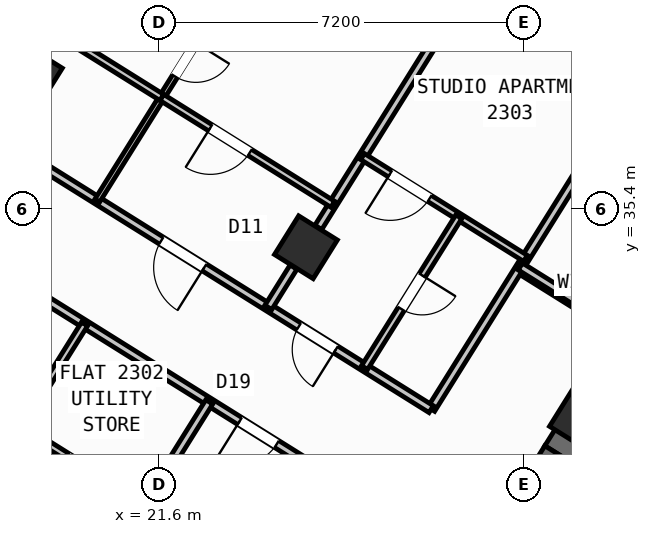
"""IFC4 building model, lengths in metres.
Left out: names, types, materials, properties, quantities, classifications, styles, units other than length and angle.
Written with IfcOpenShell. Run it as: python <this file> out.ifc"""

import sys

from ifc_helpers import new_model, si_unit, direction, frame, frame_2d, origin, origin_2d, place, context, subcontext, project, spatial, rectangle, hollow_rectangle, extrude, source, transform, mapped, element, fill, save


model = new_model("IFC4")
c1 = context("Model", 3, precision=1e-05, world=origin(), true_north=direction((0.0, 1.0)))
c2 = subcontext(c1, "Body", "Model", "MODEL_VIEW")
j1 = project(units=[si_unit("LENGTHUNIT", "METRE"), si_unit("PLANEANGLEUNIT", "RADIAN")], contexts=[c1])
p1 = place(None, origin())
s1 = spatial("IfcSite", under=j1, at=p1, CompositionType="ELEMENT")
p2 = place(p1, origin())
s2 = spatial("IfcBuilding", under=s1, at=p2, CompositionType="ELEMENT")
p3 = place(p2, frame((0.0, 0.0, 93.6)))
s3 = spatial("IfcBuildingStorey", under=s2, at=p3, CompositionType="ELEMENT", Elevation=93.6)
p4 = place(p3, frame((40.615, 23.983, 0.0), z_axis=(0.0, 0.0, 1.0), x_axis=(-0.848045953968, 0.529922692436, 0.0)))
e1 = element("IfcWall", 1, at=p4, inside=s3, PredefinedType="SHEAR", context=c2, shape_type="SweptSolid", body=[
    extrude(rectangle(XDim=13.24, YDim=0.65, at=frame_2d((6.62, 0.0))), origin(), (0.0, 0.0, 1.0), 3.35),
])
p5 = place(p3, frame((29.491, 30.552, 0.0), z_axis=(0.0, 0.0, 1.0), x_axis=(-0.529893103397, -0.8480644427, 0.0)))
e2 = element("IfcWall", 2, at=p5, inside=s3, PredefinedType="SHEAR", context=c2, shape_type="SweptSolid", body=[
    extrude(rectangle(XDim=3.525, YDim=0.65, at=frame_2d((1.763, 0.0))), origin(), (0.0, 0.0, 1.0), 3.35),
])
m1 = source(origin(), c2, "Body", "SweptSolid", [
    extrude(hollow_rectangle(XDim=0.9, YDim=0.9, WallThickness=0.036, at=origin_2d()), origin(), (0.0, 0.0, 1.0), 3.6),
])
for number, where, z_axis, x_axis in (
    (3, (29.928, 31.251, 0.0), (0.0, 0.0, 1.0), (-0.848, 0.53, 0.0)),
    (4, (24.5, 34.643, 0.0), (0.0, 0.0, 1.0), (-0.848, 0.53, 0.0)),
    (5, (19.073, 38.034, 0.0), (0.0, 0.0, 1.0), (-0.848, 0.53, 0.0)),
):
    element("IfcColumn", number, at=place(p3, frame(where, z_axis=z_axis, x_axis=x_axis)), inside=s3, PredefinedType="COLUMN", context=c2, shape_type="MappedRepresentation", body=[
        mapped(m1, transform((0.0, 0.0, 0.0), scale=1.0)),
    ])
p6 = place(p3, frame((17.424, 47.083, 0.0), z_axis=(0.0, 0.0, 1.0), x_axis=(0.848049927979, -0.529916332693, 0.0)))
e6 = element("IfcWall", 6, at=p6, inside=s3, PredefinedType="STANDARD", context=c2, shape_type="SweptSolid", body=[
    extrude(rectangle(XDim=29.223, YDim=0.32, at=frame_2d((14.612, 0.0))), origin(), (0.0, 0.0, 1.0), 3.35),
])
p7 = place(p6, frame((3.745, 0.0, 0.0)))
e7 = element("IfcOpeningElement", 7, at=p7, cuts=e6, PredefinedType="OPENING", context=c2, shape_type="SweptSolid", body=[
    extrude(rectangle(XDim=1.05, YDim=2.15, at=frame_2d((0.525, 1.075))), frame((0.0, 0.17, 0.0), z_axis=(0.0, -1.0, 0.0), x_axis=(1.0, 0.0, 0.0)), (0.0, 0.0, 1.0), 0.34),
])
p8 = place(p6, frame((0.699, 0.0, 0.95)))
e8 = element("IfcOpeningElement", 8, at=p8, cuts=e6, PredefinedType="OPENING", context=c2, shape_type="SweptSolid", body=[
    extrude(rectangle(XDim=1.2, YDim=1.4, at=frame_2d((0.6, 0.7))), frame((0.0, 0.17, 0.0), z_axis=(0.0, -1.0, 0.0), x_axis=(1.0, 0.0, 0.0)), (0.0, 0.0, 1.0), 0.34),
])
p9 = place(p6, frame((6.951, 0.0, 1.0)))
e9 = element("IfcOpeningElement", 9, at=p9, cuts=e6, PredefinedType="OPENING", context=c2, shape_type="SweptSolid", body=[
    extrude(rectangle(XDim=0.9, YDim=1.25, at=frame_2d((0.45, 0.625))), frame((0.0, 0.17, 0.0), z_axis=(0.0, -1.0, 0.0), x_axis=(1.0, 0.0, 0.0)), (0.0, 0.0, 1.0), 0.34),
])
p10 = place(p6, frame((9.841, 0.0, 0.85)))
e10 = element("IfcOpeningElement", 10, at=p10, cuts=e6, PredefinedType="OPENING", context=c2, shape_type="SweptSolid", body=[
    extrude(rectangle(XDim=1.5, YDim=1.5, at=frame_2d((0.75, 0.75))), frame((0.0, 0.17, 0.0), z_axis=(0.0, -1.0, 0.0), x_axis=(1.0, 0.0, 0.0)), (0.0, 0.0, 1.0), 0.34),
])
p11 = place(p6, frame((13.889, 0.0, 0.95)))
e11 = element("IfcOpeningElement", 11, at=p11, cuts=e6, PredefinedType="OPENING", context=c2, shape_type="SweptSolid", body=[
    extrude(rectangle(XDim=1.2, YDim=1.4, at=frame_2d((0.6, 0.7))), frame((0.0, 0.17, 0.0), z_axis=(0.0, -1.0, 0.0), x_axis=(1.0, 0.0, 0.0)), (0.0, 0.0, 1.0), 0.34),
])
p12 = place(p6, frame((17.254, 0.0, 1.0)))
e12 = element("IfcOpeningElement", 12, at=p12, cuts=e6, PredefinedType="OPENING", context=c2, shape_type="SweptSolid", body=[
    extrude(rectangle(XDim=0.9, YDim=1.25, at=frame_2d((0.45, 0.625))), frame((0.0, 0.17, 0.0), z_axis=(0.0, -1.0, 0.0), x_axis=(1.0, 0.0, 0.0)), (0.0, 0.0, 1.0), 0.34),
])
p13 = place(p6, frame((20.764, 0.0, 0.8)))
e13 = element("IfcOpeningElement", 13, at=p13, cuts=e6, PredefinedType="OPENING", context=c2, shape_type="SweptSolid", body=[
    extrude(rectangle(XDim=2.1, YDim=1.55, at=frame_2d((1.05, 0.775))), frame((0.0, 0.17, 0.0), z_axis=(0.0, -1.0, 0.0), x_axis=(1.0, 0.0, 0.0)), (0.0, 0.0, 1.0), 0.34),
])
p14 = place(p6, frame((25.403, 0.0, 0.8)))
e14 = element("IfcOpeningElement", 14, at=p14, cuts=e6, PredefinedType="OPENING", context=c2, shape_type="SweptSolid", body=[
    extrude(rectangle(XDim=2.1, YDim=1.55, at=frame_2d((1.05, 0.775))), frame((0.0, 0.17, 0.0), z_axis=(0.0, -1.0, 0.0), x_axis=(1.0, 0.0, 0.0)), (0.0, 0.0, 1.0), 0.34),
])
p15 = place(p3, frame((30.914, 32.829, 0.0), z_axis=(0.0, 0.0, 1.0), x_axis=(-0.848008813643, 0.529982124211, 0.0)))
e15 = element("IfcWall", 15, at=p15, inside=s3, PredefinedType="PARTITIONING", context=c2, shape_type="SweptSolid", body=[
    extrude(rectangle(XDim=2.61, YDim=0.16, at=frame_2d((1.305, 0.0))), origin(), (0.0, 0.0, 1.0), 3.34),
])
p16 = place(p3, frame((31.239, 38.274, 0.0), z_axis=(0.0, 0.0, 1.0), x_axis=(-0.529928058306, -0.848042600947, 0.0)))
e16 = element("IfcWall", 16, at=p16, inside=s3, PredefinedType="PARTITIONING", context=c2, shape_type="SweptSolid", body=[
    extrude(rectangle(XDim=8.05, YDim=0.16, at=frame_2d((4.025, 0.0))), origin(), (0.0, 0.0, 1.0), 3.34),
])
p17 = place(p3, frame((26.973, 31.447, 0.0), z_axis=(0.0, 0.0, 1.0), x_axis=(-0.848048310262, 0.529918921593, 0.0)))
e17 = element("IfcWall", 17, at=p17, inside=s3, PredefinedType="PARTITIONING", context=c2, shape_type="SweptSolid", body=[
    extrude(rectangle(XDim=16.73, YDim=0.16, at=frame_2d((8.365, 0.0))), origin(), (0.0, 0.0, 1.0), 3.34),
])
p18 = place(p17, frame((2.22, 0.0, 0.0)))
e18 = element("IfcOpeningElement", 18, at=p18, cuts=e17, PredefinedType="OPENING", context=c2, shape_type="SweptSolid", body=[
    extrude(rectangle(XDim=0.86, YDim=2.05, at=frame_2d((0.43, 1.025))), frame((0.0, 0.09, 0.0), z_axis=(0.0, -1.0, 0.0), x_axis=(1.0, 0.0, 0.0)), (0.0, 0.0, 1.0), 0.18),
])
p19 = place(p17, frame((5.28, 0.0, 0.0)))
e19 = element("IfcOpeningElement", 19, at=p19, cuts=e17, PredefinedType="OPENING", context=c2, shape_type="SweptSolid", body=[
    extrude(rectangle(XDim=1.0, YDim=2.1, at=frame_2d((0.5, 1.05))), frame((0.0, 0.09, 0.0), z_axis=(0.0, -1.0, 0.0), x_axis=(1.0, 0.0, 0.0)), (0.0, 0.0, 1.0), 0.18),
])
p20 = place(p3, frame((25.807, 29.582, 0.0), z_axis=(0.0, 0.0, 1.0), x_axis=(-0.848052408131, 0.529912363569, 0.0)))
e20 = element("IfcWall", 20, at=p20, inside=s3, PredefinedType="PARTITIONING", context=c2, shape_type="SweptSolid", body=[
    extrude(rectangle(XDim=16.73, YDim=0.16, at=frame_2d((8.365, 0.0))), origin(), (0.0, 0.0, 1.0), 3.34),
])
p21 = place(p20, frame((2.22, 0.0, 0.0)))
e21 = element("IfcOpeningElement", 21, at=p21, cuts=e20, PredefinedType="OPENING", context=c2, shape_type="SweptSolid", body=[
    extrude(rectangle(XDim=0.86, YDim=2.05, at=frame_2d((0.43, 1.025))), frame((0.0, 0.09, 0.0), z_axis=(0.0, -1.0, 0.0), x_axis=(1.0, 0.0, 0.0)), (0.0, 0.0, 1.0), 0.18),
])
p22 = place(p20, frame((14.013, 0.0, 0.0)))
e22 = element("IfcOpeningElement", 22, at=p22, cuts=e20, PredefinedType="OPENING", context=c2, shape_type="SweptSolid", body=[
    extrude(rectangle(XDim=1.0, YDim=2.1, at=frame_2d((0.5, 1.05))), frame((0.0, 0.09, 0.0), z_axis=(0.0, -1.0, 0.0), x_axis=(1.0, 0.0, 0.0)), (0.0, 0.0, 1.0), 0.18),
])
p23 = place(p3, frame((22.593, 31.59, 0.0), z_axis=(0.0, 0.0, 1.0), x_axis=(-0.529924383291, -0.848044897393, 0.0)))
e23 = element("IfcWall", 23, at=p23, inside=s3, PredefinedType="PARTITIONING", context=c2, shape_type="SweptSolid", body=[
    extrude(rectangle(XDim=3.238, YDim=0.16, at=frame_2d((1.619, 0.0))), origin(), (0.0, 0.0, 1.0), 2.775),
])
p24 = place(p3, frame((21.321, 29.554, 0.0), z_axis=(0.0, 0.0, 1.0), x_axis=(-0.84803529765, 0.529939745575, 0.0)))
e24 = element("IfcWall", 24, at=p24, inside=s3, PredefinedType="PLUMBINGWALL", context=c2, shape_type="SweptSolid", body=[
    extrude(rectangle(XDim=8.527, YDim=0.14, at=frame_2d((4.264, 0.0))), origin(), (0.0, 0.0, 1.0), 3.34),
])
p25 = place(p24, frame((5.155, 0.0, 0.0)))
e25 = element("IfcOpeningElement", 25, at=p25, cuts=e24, PredefinedType="OPENING", context=c2, shape_type="SweptSolid", body=[
    extrude(rectangle(XDim=0.78, YDim=2.05, at=frame_2d((0.39, 1.025))), frame((0.0, 0.08, 0.0), z_axis=(0.0, -1.0, 0.0), x_axis=(1.0, 0.0, 0.0)), (0.0, 0.0, 1.0), 0.16),
])
p26 = place(p24, frame((1.011, 0.0, 0.0)))
e26 = element("IfcOpeningElement", 26, at=p26, cuts=e24, PredefinedType="OPENING", context=c2, shape_type="SweptSolid", body=[
    extrude(rectangle(XDim=0.78, YDim=2.05, at=frame_2d((0.39, 1.025))), frame((0.0, 0.08, 0.0), z_axis=(0.0, -1.0, 0.0), x_axis=(1.0, 0.0, 0.0)), (0.0, 0.0, 1.0), 0.16),
])
p27 = place(p3, frame((20.132, 33.128, 0.0), z_axis=(0.0, 0.0, 1.0), x_axis=(-0.529935194983, -0.848038141311, 0.0)))
e27 = element("IfcWall", 27, at=p27, inside=s3, PredefinedType="PLUMBINGWALL", context=c2, shape_type="SweptSolid", body=[
    extrude(rectangle(XDim=2.41, YDim=0.14, at=frame_2d((1.205, 0.0))), origin(), (0.0, 0.0, 1.0), 3.34),
])
p28 = place(p3, frame((20.272, 27.875, 0.0), z_axis=(0.0, 0.0, 1.0), x_axis=(-0.848056204746, 0.529906287557, 0.0)))
e28 = element("IfcWall", 28, at=p28, inside=s3, PredefinedType="PARTITIONING", context=c2, shape_type="SweptSolid", body=[
    extrude(rectangle(XDim=8.527, YDim=0.11, at=frame_2d((4.264, 0.0))), origin(), (0.0, 0.0, 1.0), 3.34),
])
p29 = place(p28, frame((0.606, 0.0, 0.0)))
e29 = element("IfcOpeningElement", 29, at=p29, cuts=e28, PredefinedType="OPENING", context=c2, shape_type="SweptSolid", body=[
    extrude(rectangle(XDim=0.92, YDim=2.08, at=frame_2d((0.46, 1.04))), frame((0.0, 0.065, 0.0), z_axis=(0.0, -1.0, 0.0), x_axis=(1.0, 0.0, 0.0)), (0.0, 0.0, 1.0), 0.13),
])
p30 = place(p28, frame((2.738, 0.0, 0.0)))
e30 = element("IfcOpeningElement", 30, at=p30, cuts=e28, PredefinedType="OPENING", context=c2, shape_type="SweptSolid", body=[
    extrude(rectangle(XDim=0.92, YDim=2.08, at=frame_2d((0.46, 1.04))), frame((0.0, 0.065, 0.0), z_axis=(0.0, -1.0, 0.0), x_axis=(1.0, 0.0, 0.0)), (0.0, 0.0, 1.0), 0.13),
])
p31 = place(p28, frame((4.869, 0.0, 0.0)))
e31 = element("IfcOpeningElement", 31, at=p31, cuts=e28, PredefinedType="OPENING", context=c2, shape_type="SweptSolid", body=[
    extrude(rectangle(XDim=0.92, YDim=2.08, at=frame_2d((0.46, 1.04))), frame((0.0, 0.065, 0.0), z_axis=(0.0, -1.0, 0.0), x_axis=(1.0, 0.0, 0.0)), (0.0, 0.0, 1.0), 0.13),
])
p32 = place(p28, frame((7.001, 0.0, 0.0)))
e32 = element("IfcOpeningElement", 32, at=p32, cuts=e28, PredefinedType="OPENING", context=c2, shape_type="SweptSolid", body=[
    extrude(rectangle(XDim=0.92, YDim=2.08, at=frame_2d((0.46, 1.04))), frame((0.0, 0.065, 0.0), z_axis=(0.0, -1.0, 0.0), x_axis=(1.0, 0.0, 0.0)), (0.0, 0.0, 1.0), 0.13),
])
p33 = place(p3, frame((27.607, 39.615, 0.0), z_axis=(0.0, 0.0, 1.0), x_axis=(-0.529913610495, -0.848051628978, 0.0)))
e33 = element("IfcWall", 33, at=p33, inside=s3, PredefinedType="PARTITIONING", context=c2, shape_type="SweptSolid", body=[
    extrude(rectangle(XDim=5.401, YDim=0.16, at=frame_2d((2.7, 0.0))), origin(), (0.0, 0.0, 1.0), 2.775),
])
p34 = place(p3, frame((24.256, 34.251, 0.0), z_axis=(0.0, 0.0, 1.0), x_axis=(-0.529952145338, -0.848027548876, 0.0)))
e34 = element("IfcWall", 34, at=p34, inside=s3, PredefinedType="PARTITIONING", context=c2, shape_type="SweptSolid", body=[
    extrude(rectangle(XDim=0.938, YDim=0.16, at=frame_2d((0.469, 0.0))), origin(), (0.0, 0.0, 1.0), 2.775),
])
p35 = place(p3, frame((28.833, 34.424, 0.0), z_axis=(0.0, 0.0, 1.0), x_axis=(-0.848059820872, 0.529900500304, 0.0)))
e35 = element("IfcWall", 35, at=p35, inside=s3, PredefinedType="PLUMBINGWALL", context=c2, shape_type="SweptSolid", body=[
    extrude(rectangle(XDim=3.79, YDim=0.14, at=frame_2d((1.895, 0.0))), origin(), (0.0, 0.0, 1.0), 3.34),
])
p36 = place(p35, frame((2.23, 0.0, 0.0)))
e36 = element("IfcOpeningElement", 36, at=p36, cuts=e35, PredefinedType="OPENING", context=c2, shape_type="SweptSolid", body=[
    extrude(rectangle(XDim=0.92, YDim=2.08, at=frame_2d((0.46, 1.04))), frame((0.0, 0.08, 0.0), z_axis=(0.0, -1.0, 0.0), x_axis=(1.0, 0.0, 0.0)), (0.0, 0.0, 1.0), 0.16),
])
p37 = place(p3, frame((27.518, 35.245, 0.0), z_axis=(0.0, 0.0, 1.0), x_axis=(-0.529948921118, -0.848029563757, 0.0)))
e37 = element("IfcWall", 37, at=p37, inside=s3, PredefinedType="PLUMBINGWALL", context=c2, shape_type="SweptSolid", body=[
    extrude(rectangle(XDim=3.51, YDim=0.14, at=frame_2d((1.755, 0.0))), origin(), (0.0, 0.0, 1.0), 2.995),
])
p38 = place(p37, frame((1.365, 0.0, 0.0)))
e38 = element("IfcOpeningElement", 38, at=p38, cuts=e37, PredefinedType="OPENING", context=c2, shape_type="SweptSolid", body=[
    extrude(rectangle(XDim=0.78, YDim=2.05, at=frame_2d((0.39, 1.025))), frame((0.0, 0.08, 0.0), z_axis=(0.0, -1.0, 0.0), x_axis=(1.0, 0.0, 0.0)), (0.0, 0.0, 1.0), 0.16),
])
p39 = place(p3, frame((24.792, 42.62, 0.0), z_axis=(0.0, 0.0, 1.0), x_axis=(-0.529925083182, -0.848044460046, 0.0)))
e39 = element("IfcWall", 39, at=p39, inside=s3, PredefinedType="PARTITIONING", context=c2, shape_type="SweptSolid", body=[
    extrude(rectangle(XDim=8.32, YDim=0.11, at=frame_2d((4.16, 0.0))), origin(), (0.0, 0.0, 1.0), 3.34),
])
p40 = place(p39, frame((4.65, 0.0, 0.0)))
e40 = element("IfcOpeningElement", 40, at=p40, cuts=e39, PredefinedType="OPENING", context=c2, shape_type="SweptSolid", body=[
    extrude(rectangle(XDim=0.78, YDim=2.05, at=frame_2d((0.39, 1.025))), frame((0.0, 0.065, 0.0), z_axis=(0.0, -1.0, 0.0), x_axis=(1.0, 0.0, 0.0)), (0.0, 0.0, 1.0), 0.13),
])
p41 = place(p3, frame((25.03, 35.491, 0.0), z_axis=(0.0, 0.0, 1.0), x_axis=(-0.848070667369, 0.52988314103, 0.0)))
e41 = element("IfcWall", 41, at=p41, inside=s3, PredefinedType="PLUMBINGWALL", context=c2, shape_type="SweptSolid", body=[
    extrude(rectangle(XDim=3.98, YDim=0.14, at=frame_2d((1.99, 0.0))), origin(), (0.0, 0.0, 1.0), 3.34),
])
p42 = place(p41, frame((1.93, 0.0, 0.0)))
e42 = element("IfcOpeningElement", 42, at=p42, cuts=e41, PredefinedType="OPENING", context=c2, shape_type="SweptSolid", body=[
    extrude(rectangle(XDim=0.92, YDim=2.08, at=frame_2d((0.46, 1.04))), frame((0.0, 0.08, 0.0), z_axis=(0.0, -1.0, 0.0), x_axis=(1.0, 0.0, 0.0)), (0.0, 0.0, 1.0), 0.16),
])
p43 = place(p3, frame((21.655, 37.6, 0.0), z_axis=(0.0, 0.0, 1.0), x_axis=(-0.848044326704, 0.52992529657, 0.0)))
e43 = element("IfcWall", 43, at=p43, inside=s3, PredefinedType="PLUMBINGWALL", context=c2, shape_type="SweptSolid", body=[
    extrude(rectangle(XDim=8.94, YDim=0.14, at=frame_2d((4.47, 0.0))), origin(), (0.0, 0.0, 1.0), 3.34),
])
p44 = place(p43, frame((2.972, 0.0, 0.0)))
e44 = element("IfcOpeningElement", 44, at=p44, cuts=e43, PredefinedType="OPENING", context=c2, shape_type="SweptSolid", body=[
    extrude(rectangle(XDim=0.78, YDim=2.05, at=frame_2d((0.39, 1.025))), frame((0.0, 0.08, 0.0), z_axis=(0.0, -1.0, 0.0), x_axis=(1.0, 0.0, 0.0)), (0.0, 0.0, 1.0), 0.16),
])
p45 = place(p43, frame((6.843, 0.0, 0.0)))
e45 = element("IfcOpeningElement", 45, at=p45, cuts=e43, PredefinedType="OPENING", context=c2, shape_type="SweptSolid", body=[
    extrude(rectangle(XDim=0.78, YDim=2.05, at=frame_2d((0.39, 1.025))), frame((0.0, 0.08, 0.0), z_axis=(0.0, -1.0, 0.0), x_axis=(1.0, 0.0, 0.0)), (0.0, 0.0, 1.0), 0.16),
])
p46 = place(p3, frame((41.936, 26.012, 0.0), z_axis=(0.0, 0.0, 1.0), x_axis=(-0.848051154596, 0.529914369676, 0.0)))
e46 = element("IfcWall", 46, at=p46, inside=s3, PredefinedType="PARTITIONING", context=c2, shape_type="SweptSolid", body=[
    extrude(rectangle(XDim=15.57, YDim=0.16, at=frame_2d((7.785, 0.0))), origin(), (0.0, 0.0, 1.0), 3.34),
])
p47 = place(p46, frame((10.83, 0.0, 0.0)))
e47 = element("IfcOpeningElement", 47, at=p47, cuts=e46, PredefinedType="OPENING", context=c2, shape_type="SweptSolid", body=[
    extrude(rectangle(XDim=1.0, YDim=2.1, at=frame_2d((0.5, 1.05))), frame((0.0, 0.09, 0.0), z_axis=(0.0, -1.0, 0.0), x_axis=(1.0, 0.0, 0.0)), (0.0, 0.0, 1.0), 0.18),
])
m2 = source(origin(), c2, "Body", "SweptSolid", [
    extrude(rectangle(XDim=0.86, YDim=2.05, at=frame_2d((0.43, 1.025))), frame((0.0, 0.025, 0.0), z_axis=(0.0, -1.0, 0.0), x_axis=(1.0, 0.0, 0.0)), (0.0, 0.0, 1.0), 0.05),
])
p48 = place(p21, origin())
e48 = element("IfcDoor", 48, at=p48, inside=s3, OperationType="SINGLE_SWING_RIGHT", PredefinedType="DOOR", context=c2, shape_type="MappedRepresentation", body=[
    mapped(m2, transform((0.0, 0.0, 0.0), scale=1.0)),
])
fill(e21, e48)
p49 = place(p18, origin())
e49 = element("IfcDoor", 49, at=p49, inside=s3, OperationType="SINGLE_SWING_LEFT", PredefinedType="DOOR", context=c2, shape_type="MappedRepresentation", body=[
    mapped(m2, transform((0.0, 0.0, 0.0), scale=1.0)),
])
fill(e18, e49)
m3 = source(origin(), c2, "Body", "SweptSolid", [
    extrude(rectangle(XDim=0.92, YDim=2.08, at=frame_2d((0.46, 1.04))), frame((0.0, 0.025, 0.0), z_axis=(0.0, -1.0, 0.0), x_axis=(1.0, 0.0, 0.0)), (0.0, 0.0, 1.0), 0.05),
])
p50 = place(p36, origin())
e50 = element("IfcDoor", 50, at=p50, inside=s3, OperationType="SINGLE_SWING_RIGHT", PredefinedType="DOOR", context=c2, shape_type="MappedRepresentation", body=[
    mapped(m3, transform((0.0, 0.0, 0.0), scale=1.0)),
])
fill(e36, e50)
m4 = source(origin(), c2, "Body", "SweptSolid", [
    extrude(rectangle(XDim=0.78, YDim=2.05, at=frame_2d((0.39, 1.025))), frame((0.0, 0.025, 0.0), z_axis=(0.0, -1.0, 0.0), x_axis=(1.0, 0.0, 0.0)), (0.0, 0.0, 1.0), 0.05),
])
p51 = place(p38, origin())
e51 = element("IfcDoor", 51, at=p51, inside=s3, OperationType="SINGLE_SWING_LEFT", PredefinedType="DOOR", context=c2, shape_type="MappedRepresentation", body=[
    mapped(m4, transform((0.0, 0.0, 0.0), scale=1.0)),
])
fill(e38, e51)
m5 = source(origin(), c2, "Body", "SweptSolid", [
    extrude(rectangle(XDim=1.0, YDim=2.1, at=frame_2d((0.5, 1.05))), frame((0.0, 0.025, 0.0), z_axis=(0.0, -1.0, 0.0), x_axis=(1.0, 0.0, 0.0)), (0.0, 0.0, 1.0), 0.05),
])
p52 = place(p19, origin())
e52 = element("IfcDoor", 52, at=p52, inside=s3, OperationType="SINGLE_SWING_LEFT", PredefinedType="DOOR", context=c2, shape_type="MappedRepresentation", body=[
    mapped(m5, transform((0.0, 0.0, 0.0), scale=1.0)),
])
fill(e19, e52)
p53 = place(p42, origin())
e53 = element("IfcDoor", 53, at=p53, inside=s3, OperationType="SINGLE_SWING_RIGHT", PredefinedType="DOOR", context=c2, shape_type="MappedRepresentation", body=[
    mapped(m3, transform((0.0, 0.0, 0.0), scale=1.0)),
])
fill(e42, e53)
p54 = place(p40, origin())
e54 = element("IfcDoor", 54, at=p54, inside=s3, OperationType="SINGLE_SWING_LEFT", PredefinedType="DOOR", context=c2, shape_type="MappedRepresentation", body=[
    mapped(m4, transform((0.0, 0.0, 0.0), scale=1.0)),
])
fill(e40, e54)
save(model, sys.argv[1])
